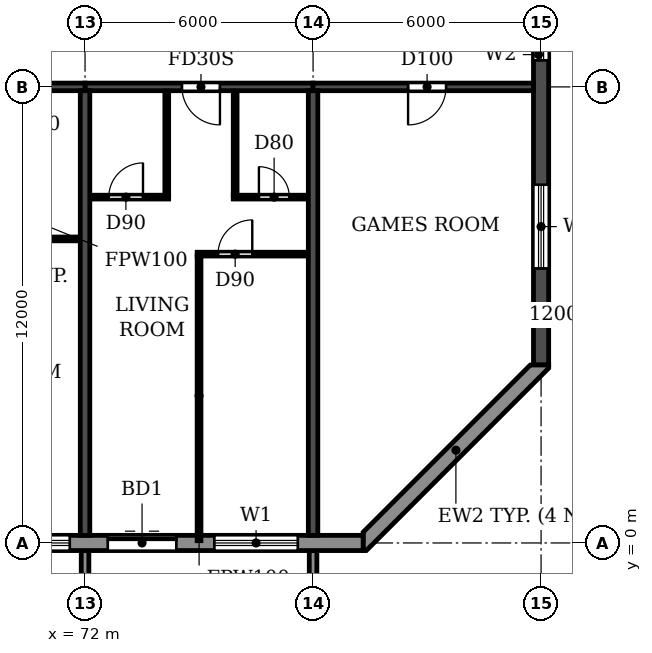
"""IFC4 building model, lengths in metres.
Left out: names, types, materials, properties, quantities, classifications, styles, units other than length and angle.
Written with IfcOpenShell. Run it as: python <this file> out.ifc"""

import sys

from ifc_helpers import new_model, si_unit, direction, frame, frame_2d, origin, place, context, subcontext, project, spatial, polyline, rectangle, outline, extrude, source, transform, mapped, element, fill, save


model = new_model("IFC4")
c1 = context("Model", 3, precision=1e-05, world=origin(), true_north=direction((0.0, 1.0)))
c2 = subcontext(c1, "Body", "Model", "MODEL_VIEW")
j1 = project(units=[si_unit("LENGTHUNIT", "METRE"), si_unit("PLANEANGLEUNIT", "RADIAN")], contexts=[c1])
p1 = place(None, origin())
s1 = spatial("IfcSite", under=j1, at=p1, CompositionType="ELEMENT")
p2 = place(p1, origin())
s2 = spatial("IfcBuilding", under=s1, at=p2, CompositionType="ELEMENT")
p3 = place(p2, frame((0.0, 0.0, 221.4)))
s3 = spatial("IfcBuildingStorey", under=s2, at=p3, CompositionType="ELEMENT", Elevation=221.4)
for number, where, z_axis, x_axis in (
    (1, (72.0, 0.2, 0.0), (0.0, 0.0, 1.0), (0.0, 1.0, 0.0)),
    (2, (78.0, 0.2, 0.0), (0.0, 0.0, 1.0), (0.0, 1.0, 0.0)),
):
    element("IfcWall", number, at=place(p3, frame(where, z_axis=z_axis, x_axis=x_axis)), inside=s3, PredefinedType="SHEAR", context=c2, shape_type="SweptSolid", body=[
        extrude(rectangle(XDim=11.7, YDim=0.25, at=frame_2d((5.85, 0.0))), origin(), (0.0, 0.0, 1.0), 3.08),
    ])
p4 = place(p3, frame((84.0, 4.683, 0.0), z_axis=(0.0, 0.0, 1.0), x_axis=(0.0, 1.0, 0.0)))
e3 = element("IfcWall", 3, at=p4, inside=s3, PredefinedType="SHEAR", context=c2, shape_type="SweptSolid", body=[
    extrude(rectangle(XDim=31.834, YDim=0.4, at=frame_2d((15.917, 0.0))), origin(), (0.0, 0.0, 1.0), 3.08),
])
p5 = place(p4, frame((23.817, 0.0, 0.9)))
e4 = element("IfcOpeningElement", 4, at=p5, cuts=e3, PredefinedType="OPENING", context=c2, shape_type="SweptSolid", body=[
    extrude(rectangle(XDim=1.2, YDim=1.5, at=frame_2d((0.6, 0.75))), frame((0.0, 0.21, 0.0), z_axis=(0.0, -1.0, 0.0), x_axis=(1.0, 0.0, 0.0)), (0.0, 0.0, 1.0), 0.42),
])
p6 = place(p4, frame((8.017, 0.0, 0.9)))
e5 = element("IfcOpeningElement", 5, at=p6, cuts=e3, PredefinedType="OPENING", context=c2, shape_type="SweptSolid", body=[
    extrude(rectangle(XDim=1.2, YDim=1.5, at=frame_2d((0.6, 0.75))), frame((0.0, 0.21, 0.0), z_axis=(0.0, -1.0, 0.0), x_axis=(1.0, 0.0, 0.0)), (0.0, 0.0, 1.0), 0.42),
])
p7 = place(p4, frame((27.694, 0.0, 0.6)))
e6 = element("IfcOpeningElement", 6, at=p7, cuts=e3, PredefinedType="OPENING", context=c2, shape_type="SweptSolid", body=[
    extrude(rectangle(XDim=2.2, YDim=1.8, at=frame_2d((1.1, 0.9))), frame((0.0, 0.21, 0.0), z_axis=(0.0, -1.0, 0.0), x_axis=(1.0, 0.0, 0.0)), (0.0, 0.0, 1.0), 0.42),
])
p8 = place(p4, frame((2.541, 0.0, 0.6)))
e7 = element("IfcOpeningElement", 7, at=p8, cuts=e3, PredefinedType="OPENING", context=c2, shape_type="SweptSolid", body=[
    extrude(rectangle(XDim=2.2, YDim=1.8, at=frame_2d((1.1, 0.9))), frame((0.0, 0.21, 0.0), z_axis=(0.0, -1.0, 0.0), x_axis=(1.0, 0.0, 0.0)), (0.0, 0.0, 1.0), 0.42),
])
p9 = place(p4, frame((15.917, 0.0, 0.9)))
e8 = element("IfcOpeningElement", 8, at=p9, cuts=e3, PredefinedType="OPENING", context=c2, shape_type="SweptSolid", body=[
    extrude(rectangle(XDim=1.2, YDim=1.5, at=frame_2d((0.6, 0.75))), frame((0.0, 0.21, 0.0), z_axis=(0.0, -1.0, 0.0), x_axis=(1.0, 0.0, 0.0)), (0.0, 0.0, 1.0), 0.42),
])
p10 = place(p3, frame((66.0, 12.0, 0.0), z_axis=(0.0, 0.0, 1.0), x_axis=(1.0, 0.0, 0.0)))
e9 = element("IfcWall", 9, at=p10, inside=s3, PredefinedType="SHEAR", context=c2, shape_type="SweptSolid", body=[
    extrude(rectangle(XDim=6.0, YDim=0.2, at=frame_2d((3.0, 0.0))), origin(), (0.0, 0.0, 1.0), 2.48),
])
p11 = place(p10, frame((2.45, 0.0, 0.0)))
e10 = element("IfcOpeningElement", 10, at=p11, cuts=e9, PredefinedType="OPENING", context=c2, shape_type="SweptSolid", body=[
    extrude(rectangle(XDim=1.0, YDim=2.1, at=frame_2d((0.5, 1.05))), frame((0.0, 0.11, 0.0), z_axis=(0.0, -1.0, 0.0), x_axis=(1.0, 0.0, 0.0)), (0.0, 0.0, 1.0), 0.22),
])
p12 = place(p3, frame((72.0, 12.0, 0.0), z_axis=(0.0, 0.0, 1.0), x_axis=(1.0, 0.0, 0.0)))
e11 = element("IfcWall", 11, at=p12, inside=s3, PredefinedType="SHEAR", context=c2, shape_type="SweptSolid", body=[
    extrude(rectangle(XDim=6.0, YDim=0.2, at=frame_2d((3.0, 0.0))), origin(), (0.0, 0.0, 1.0), 2.48),
])
p13 = place(p12, frame((2.55, 0.0, 0.0)))
e12 = element("IfcOpeningElement", 12, at=p13, cuts=e11, PredefinedType="OPENING", context=c2, shape_type="SweptSolid", body=[
    extrude(rectangle(XDim=1.0, YDim=2.1, at=frame_2d((0.5, 1.05))), frame((0.0, 0.11, 0.0), z_axis=(0.0, -1.0, 0.0), x_axis=(1.0, 0.0, 0.0)), (0.0, 0.0, 1.0), 0.22),
])
p14 = place(p3, frame((78.0, 12.0, 0.0), z_axis=(0.0, 0.0, 1.0), x_axis=(1.0, 0.0, 0.0)))
e13 = element("IfcWall", 13, at=p14, inside=s3, PredefinedType="SHEAR", context=c2, shape_type="SweptSolid", body=[
    extrude(rectangle(XDim=5.8, YDim=0.2, at=frame_2d((2.9, 0.0))), origin(), (0.0, 0.0, 1.0), 2.48),
])
p15 = place(p14, frame((2.5, 0.0, 0.0)))
e14 = element("IfcOpeningElement", 14, at=p15, cuts=e13, PredefinedType="OPENING", context=c2, shape_type="SweptSolid", body=[
    extrude(rectangle(XDim=1.0, YDim=2.1, at=frame_2d((0.5, 1.05))), frame((0.0, 0.11, 0.0), z_axis=(0.0, -1.0, 0.0), x_axis=(1.0, 0.0, 0.0)), (0.0, 0.0, 1.0), 0.22),
])
p16 = place(p3, frame((22.683, 0.0, 0.0), z_axis=(0.0, 0.0, 1.0), x_axis=(1.0, 0.0, 0.0)))
e15 = element("IfcWall", 15, at=p16, inside=s3, PredefinedType="STANDARD", context=c2, shape_type="SweptSolid", body=[
    extrude(rectangle(XDim=56.634, YDim=0.4, at=frame_2d((28.317, 0.0))), origin(), (0.0, 0.0, 1.0), 3.08),
])
p17 = place(p16, frame((1.717, 0.0, 0.9)))
e16 = element("IfcOpeningElement", 16, at=p17, cuts=e15, PredefinedType="OPENING", context=c2, shape_type="SweptSolid", body=[
    extrude(rectangle(XDim=2.2, YDim=1.5, at=frame_2d((1.1, 0.75))), frame((0.0, 0.21, 0.0), z_axis=(0.0, -1.0, 0.0), x_axis=(1.0, 0.0, 0.0)), (0.0, 0.0, 1.0), 0.42),
])
p18 = place(p16, frame((4.917, 0.0, 0.0)))
e17 = element("IfcOpeningElement", 17, at=p18, cuts=e15, PredefinedType="OPENING", context=c2, shape_type="SweptSolid", body=[
    extrude(rectangle(XDim=1.8, YDim=2.4, at=frame_2d((0.9, 1.2))), frame((0.0, 0.21, 0.0), z_axis=(0.0, -1.0, 0.0), x_axis=(1.0, 0.0, 0.0)), (0.0, 0.0, 1.0), 0.42),
])
p19 = place(p16, frame((7.717, 0.0, 0.9)))
e18 = element("IfcOpeningElement", 18, at=p19, cuts=e15, PredefinedType="OPENING", context=c2, shape_type="SweptSolid", body=[
    extrude(rectangle(XDim=2.2, YDim=1.5, at=frame_2d((1.1, 0.75))), frame((0.0, 0.21, 0.0), z_axis=(0.0, -1.0, 0.0), x_axis=(1.0, 0.0, 0.0)), (0.0, 0.0, 1.0), 0.42),
])
p20 = place(p16, frame((10.717, 0.0, 0.9)))
e19 = element("IfcOpeningElement", 19, at=p20, cuts=e15, PredefinedType="OPENING", context=c2, shape_type="SweptSolid", body=[
    extrude(rectangle(XDim=2.2, YDim=1.5, at=frame_2d((1.1, 0.75))), frame((0.0, 0.21, 0.0), z_axis=(0.0, -1.0, 0.0), x_axis=(1.0, 0.0, 0.0)), (0.0, 0.0, 1.0), 0.42),
])
p21 = place(p16, frame((13.717, 0.0, 0.9)))
e20 = element("IfcOpeningElement", 20, at=p21, cuts=e15, PredefinedType="OPENING", context=c2, shape_type="SweptSolid", body=[
    extrude(rectangle(XDim=2.2, YDim=1.5, at=frame_2d((1.1, 0.75))), frame((0.0, 0.21, 0.0), z_axis=(0.0, -1.0, 0.0), x_axis=(1.0, 0.0, 0.0)), (0.0, 0.0, 1.0), 0.42),
])
p22 = place(p16, frame((16.917, 0.0, 0.0)))
e21 = element("IfcOpeningElement", 21, at=p22, cuts=e15, PredefinedType="OPENING", context=c2, shape_type="SweptSolid", body=[
    extrude(rectangle(XDim=1.8, YDim=2.4, at=frame_2d((0.9, 1.2))), frame((0.0, 0.21, 0.0), z_axis=(0.0, -1.0, 0.0), x_axis=(1.0, 0.0, 0.0)), (0.0, 0.0, 1.0), 0.42),
])
p23 = place(p16, frame((19.717, 0.0, 0.9)))
e22 = element("IfcOpeningElement", 22, at=p23, cuts=e15, PredefinedType="OPENING", context=c2, shape_type="SweptSolid", body=[
    extrude(rectangle(XDim=2.2, YDim=1.5, at=frame_2d((1.1, 0.75))), frame((0.0, 0.21, 0.0), z_axis=(0.0, -1.0, 0.0), x_axis=(1.0, 0.0, 0.0)), (0.0, 0.0, 1.0), 0.42),
])
p24 = place(p16, frame((22.717, 0.0, 0.9)))
e23 = element("IfcOpeningElement", 23, at=p24, cuts=e15, PredefinedType="OPENING", context=c2, shape_type="SweptSolid", body=[
    extrude(rectangle(XDim=2.2, YDim=1.5, at=frame_2d((1.1, 0.75))), frame((0.0, 0.21, 0.0), z_axis=(0.0, -1.0, 0.0), x_axis=(1.0, 0.0, 0.0)), (0.0, 0.0, 1.0), 0.42),
])
p25 = place(p16, frame((25.917, 0.0, 0.0)))
e24 = element("IfcOpeningElement", 24, at=p25, cuts=e15, PredefinedType="OPENING", context=c2, shape_type="SweptSolid", body=[
    extrude(rectangle(XDim=1.8, YDim=2.4, at=frame_2d((0.9, 1.2))), frame((0.0, 0.21, 0.0), z_axis=(0.0, -1.0, 0.0), x_axis=(1.0, 0.0, 0.0)), (0.0, 0.0, 1.0), 0.42),
])
p26 = place(p16, frame((28.717, 0.0, 0.9)))
e25 = element("IfcOpeningElement", 25, at=p26, cuts=e15, PredefinedType="OPENING", context=c2, shape_type="SweptSolid", body=[
    extrude(rectangle(XDim=2.2, YDim=1.5, at=frame_2d((1.1, 0.75))), frame((0.0, 0.21, 0.0), z_axis=(0.0, -1.0, 0.0), x_axis=(1.0, 0.0, 0.0)), (0.0, 0.0, 1.0), 0.42),
])
p27 = place(p16, frame((31.717, 0.0, 0.9)))
e26 = element("IfcOpeningElement", 26, at=p27, cuts=e15, PredefinedType="OPENING", context=c2, shape_type="SweptSolid", body=[
    extrude(rectangle(XDim=2.2, YDim=1.5, at=frame_2d((1.1, 0.75))), frame((0.0, 0.21, 0.0), z_axis=(0.0, -1.0, 0.0), x_axis=(1.0, 0.0, 0.0)), (0.0, 0.0, 1.0), 0.42),
])
p28 = place(p16, frame((34.717, 0.0, 0.9)))
e27 = element("IfcOpeningElement", 27, at=p28, cuts=e15, PredefinedType="OPENING", context=c2, shape_type="SweptSolid", body=[
    extrude(rectangle(XDim=2.2, YDim=1.5, at=frame_2d((1.1, 0.75))), frame((0.0, 0.21, 0.0), z_axis=(0.0, -1.0, 0.0), x_axis=(1.0, 0.0, 0.0)), (0.0, 0.0, 1.0), 0.42),
])
p29 = place(p16, frame((37.917, 0.0, 0.0)))
e28 = element("IfcOpeningElement", 28, at=p29, cuts=e15, PredefinedType="OPENING", context=c2, shape_type="SweptSolid", body=[
    extrude(rectangle(XDim=1.8, YDim=2.4, at=frame_2d((0.9, 1.2))), frame((0.0, 0.21, 0.0), z_axis=(0.0, -1.0, 0.0), x_axis=(1.0, 0.0, 0.0)), (0.0, 0.0, 1.0), 0.42),
])
p30 = place(p16, frame((40.717, 0.0, 0.9)))
e29 = element("IfcOpeningElement", 29, at=p30, cuts=e15, PredefinedType="OPENING", context=c2, shape_type="SweptSolid", body=[
    extrude(rectangle(XDim=2.2, YDim=1.5, at=frame_2d((1.1, 0.75))), frame((0.0, 0.21, 0.0), z_axis=(0.0, -1.0, 0.0), x_axis=(1.0, 0.0, 0.0)), (0.0, 0.0, 1.0), 0.42),
])
p31 = place(p16, frame((43.717, 0.0, 0.9)))
e30 = element("IfcOpeningElement", 30, at=p31, cuts=e15, PredefinedType="OPENING", context=c2, shape_type="SweptSolid", body=[
    extrude(rectangle(XDim=2.2, YDim=1.5, at=frame_2d((1.1, 0.75))), frame((0.0, 0.21, 0.0), z_axis=(0.0, -1.0, 0.0), x_axis=(1.0, 0.0, 0.0)), (0.0, 0.0, 1.0), 0.42),
])
p32 = place(p16, frame((46.717, 0.0, 0.9)))
e31 = element("IfcOpeningElement", 31, at=p32, cuts=e15, PredefinedType="OPENING", context=c2, shape_type="SweptSolid", body=[
    extrude(rectangle(XDim=2.2, YDim=1.5, at=frame_2d((1.1, 0.75))), frame((0.0, 0.21, 0.0), z_axis=(0.0, -1.0, 0.0), x_axis=(1.0, 0.0, 0.0)), (0.0, 0.0, 1.0), 0.42),
])
p33 = place(p16, frame((49.917, 0.0, 0.0)))
e32 = element("IfcOpeningElement", 32, at=p33, cuts=e15, PredefinedType="OPENING", context=c2, shape_type="SweptSolid", body=[
    extrude(rectangle(XDim=1.8, YDim=2.4, at=frame_2d((0.9, 1.2))), frame((0.0, 0.21, 0.0), z_axis=(0.0, -1.0, 0.0), x_axis=(1.0, 0.0, 0.0)), (0.0, 0.0, 1.0), 0.42),
])
p34 = place(p16, frame((52.717, 0.0, 0.9)))
e33 = element("IfcOpeningElement", 33, at=p34, cuts=e15, PredefinedType="OPENING", context=c2, shape_type="SweptSolid", body=[
    extrude(rectangle(XDim=2.2, YDim=1.5, at=frame_2d((1.1, 0.75))), frame((0.0, 0.21, 0.0), z_axis=(0.0, -1.0, 0.0), x_axis=(1.0, 0.0, 0.0)), (0.0, 0.0, 1.0), 0.42),
])
p35 = place(p3, origin())
e34 = element("IfcWall", 34, at=p35, inside=s3, PredefinedType="STANDARD", context=c2, shape_type="SweptSolid", body=[
    extrude(outline(polyline([(79.317, -0.2), (79.4, -0.2), (84.2, 4.6), (84.2, 4.683), (83.717, 4.683), (79.317, 0.283), (79.317, -0.2)])), origin(), (0.0, 0.0, 1.0), 3.08),
])
m1 = source(origin(), c2, "Body", "SweptSolid", [
    extrude(outline(polyline([(0.0, 0.0), (0.2, 0.0), (0.2, 1.65), (0.0, 1.65), (0.0, 0.0)])), origin(), (0.0, 0.0, 1.0), 3.1),
])
for number, where in (
    (35, (71.9, -1.85, 0.0)),
    (36, (77.9, -1.85, 0.0)),
):
    element("IfcWall", number, at=place(p3, frame(where)), inside=s3, PredefinedType="STANDARD", context=c2, shape_type="MappedRepresentation", body=[
        mapped(m1, transform((0.0, 0.0, 0.0))),
    ])
p36 = place(p3, frame((74.95, 7.6, 0.0), z_axis=(0.0, 0.0, 1.0), x_axis=(1.0, 0.0, 0.0)))
e37 = element("IfcWall", 37, at=p36, inside=s3, PredefinedType="PARTITIONING", context=c2, shape_type="SweptSolid", body=[
    extrude(rectangle(XDim=2.915, YDim=0.1, at=frame_2d((1.458, 0.0))), origin(), (0.0, 0.0, 1.0), 3.08),
])
p37 = place(p36, frame((0.55, 0.0, 0.0)))
e38 = element("IfcOpeningElement", 38, at=p37, cuts=e37, PredefinedType="OPENING", context=c2, shape_type="SweptSolid", body=[
    extrude(rectangle(XDim=0.9, YDim=2.1, at=frame_2d((0.45, 1.05))), frame((0.0, 0.06, 0.0), z_axis=(0.0, -1.0, 0.0), x_axis=(1.0, 0.0, 0.0)), (0.0, 0.0, 1.0), 0.12),
])
p38 = place(p3, frame((69.8, 8.0, 0.0), z_axis=(0.0, 0.0, 1.0), x_axis=(1.0, 0.0, 0.0)))
e39 = element("IfcWall", 39, at=p38, inside=s3, PredefinedType="PARTITIONING", context=c2, shape_type="SweptSolid", body=[
    extrude(rectangle(XDim=2.065, YDim=0.1, at=frame_2d((1.032, 0.0))), origin(), (0.0, 0.0, 1.0), 3.08),
])
p39 = place(p3, frame((72.135, 9.1, 0.0), z_axis=(0.0, 0.0, 1.0), x_axis=(1.0, 0.0, 0.0)))
e40 = element("IfcWall", 40, at=p39, inside=s3, PredefinedType="PARTITIONING", context=c2, shape_type="SweptSolid", body=[
    extrude(rectangle(XDim=2.065, YDim=0.1, at=frame_2d((1.032, 0.0))), origin(), (0.0, 0.0, 1.0), 3.08),
])
p40 = place(p39, frame((0.49, 0.0, 0.0)))
e41 = element("IfcOpeningElement", 41, at=p40, cuts=e40, PredefinedType="OPENING", context=c2, shape_type="SweptSolid", body=[
    extrude(rectangle(XDim=0.9, YDim=2.1, at=frame_2d((0.45, 1.05))), frame((0.0, 0.06, 0.0), z_axis=(0.0, -1.0, 0.0), x_axis=(1.0, 0.0, 0.0)), (0.0, 0.0, 1.0), 0.12),
])
p41 = place(p3, frame((75.9, 9.1, 0.0), z_axis=(0.0, 0.0, 1.0), x_axis=(1.0, 0.0, 0.0)))
e42 = element("IfcWall", 42, at=p41, inside=s3, PredefinedType="PARTITIONING", context=c2, shape_type="SweptSolid", body=[
    extrude(rectangle(XDim=1.965, YDim=0.1, at=frame_2d((0.982, 0.0))), origin(), (0.0, 0.0, 1.0), 3.08),
])
p42 = place(p41, frame((0.675, 0.0, 0.0)))
e43 = element("IfcOpeningElement", 43, at=p42, cuts=e42, PredefinedType="OPENING", context=c2, shape_type="SweptSolid", body=[
    extrude(rectangle(XDim=0.8, YDim=2.1, at=frame_2d((0.4, 1.05))), frame((0.0, 0.06, 0.0), z_axis=(0.0, -1.0, 0.0), x_axis=(1.0, 0.0, 0.0)), (0.0, 0.0, 1.0), 0.12),
])
p43 = place(p3, frame((74.15, 9.15, 0.0), z_axis=(0.0, 0.0, 1.0), x_axis=(0.0, 1.0, 0.0)))
e44 = element("IfcWall", 44, at=p43, inside=s3, PredefinedType="PARTITIONING", context=c2, shape_type="SweptSolid", body=[
    extrude(rectangle(XDim=2.74, YDim=0.1, at=frame_2d((1.37, 0.0))), origin(), (0.0, 0.0, 1.0), 3.08),
])
p44 = place(p3, frame((75.0, 0.06, 0.0), z_axis=(0.0, 0.0, 1.0), x_axis=(0.0, 1.0, 0.0)))
e45 = element("IfcWall", 45, at=p44, inside=s3, PredefinedType="PARTITIONING", context=c2, shape_type="SweptSolid", body=[
    extrude(rectangle(XDim=7.49, YDim=0.1, at=frame_2d((3.745, 0.0))), origin(), (0.0, 0.0, 1.0), 3.08),
])
p45 = place(p3, frame((75.95, 9.15, 0.0), z_axis=(0.0, 0.0, 1.0), x_axis=(0.0, 1.0, 0.0)))
e46 = element("IfcWall", 46, at=p45, inside=s3, PredefinedType="PARTITIONING", context=c2, shape_type="SweptSolid", body=[
    extrude(rectangle(XDim=2.74, YDim=0.1, at=frame_2d((1.37, 0.0))), origin(), (0.0, 0.0, 1.0), 3.08),
])
p46 = place(p32, origin())
e47 = element("IfcWindow", 47, at=p46, inside=s3, PartitioningType="DOUBLE_PANEL_HORIZONTAL", PredefinedType="WINDOW", context=c2, shape_type="SweptSolid", body=[
    extrude(rectangle(XDim=2.2, YDim=1.5, at=frame_2d((1.1, 0.75))), frame((0.0, 0.03, 0.0), z_axis=(0.0, -1.0, 0.0), x_axis=(1.0, 0.0, 0.0)), (0.0, 0.0, 1.0), 0.06),
])
fill(e31, e47)
p47 = place(p33, origin())
e48 = element("IfcDoor", 48, at=p47, inside=s3, OperationType="DOUBLE_DOOR_SLIDING", PredefinedType="DOOR", context=c2, shape_type="SweptSolid", body=[
    extrude(rectangle(XDim=1.8, YDim=2.4, at=frame_2d((0.9, 1.2))), frame((0.0, 0.025, 0.0), z_axis=(0.0, -1.0, 0.0), x_axis=(1.0, 0.0, 0.0)), (0.0, 0.0, 1.0), 0.05),
])
fill(e32, e48)
p48 = place(p34, origin())
e49 = element("IfcWindow", 49, at=p48, inside=s3, PartitioningType="DOUBLE_PANEL_HORIZONTAL", PredefinedType="WINDOW", context=c2, shape_type="SweptSolid", body=[
    extrude(rectangle(XDim=2.2, YDim=1.5, at=frame_2d((1.1, 0.75))), frame((0.0, 0.03, 0.0), z_axis=(0.0, -1.0, 0.0), x_axis=(1.0, 0.0, 0.0)), (0.0, 0.0, 1.0), 0.06),
])
fill(e33, e49)
p49 = place(p6, origin())
e50 = element("IfcWindow", 50, at=p49, inside=s3, PartitioningType="SINGLE_PANEL", PredefinedType="WINDOW", context=c2, shape_type="SweptSolid", body=[
    extrude(rectangle(XDim=1.2, YDim=1.5, at=frame_2d((0.6, 0.75))), frame((0.0, 0.03, 0.0), z_axis=(0.0, -1.0, 0.0), x_axis=(1.0, 0.0, 0.0)), (0.0, 0.0, 1.0), 0.06),
])
fill(e5, e50)
p50 = place(p8, origin())
e51 = element("IfcWindow", 51, at=p50, inside=s3, PartitioningType="DOUBLE_PANEL_HORIZONTAL", PredefinedType="WINDOW", context=c2, shape_type="SweptSolid", body=[
    extrude(rectangle(XDim=2.2, YDim=1.8, at=frame_2d((1.1, 0.9))), frame((0.0, 0.03, 0.0), z_axis=(0.0, -1.0, 0.0), x_axis=(1.0, 0.0, 0.0)), (0.0, 0.0, 1.0), 0.06),
])
fill(e7, e51)
p51 = place(p40, origin())
e52 = element("IfcDoor", 52, at=p51, inside=s3, OperationType="SINGLE_SWING_RIGHT", PredefinedType="DOOR", context=c2, shape_type="SweptSolid", body=[
    extrude(rectangle(XDim=0.9, YDim=2.1, at=frame_2d((0.45, 1.05))), frame((0.0, 0.025, 0.0), z_axis=(0.0, -1.0, 0.0), x_axis=(1.0, 0.0, 0.0)), (0.0, 0.0, 1.0), 0.05),
])
fill(e41, e52)
p52 = place(p13, frame((1.0, 0.0, 0.0), z_axis=(0.0, 0.0, 1.0), x_axis=(-1.0, 0.0, 0.0)))
e53 = element("IfcDoor", 53, at=p52, inside=s3, OperationType="SINGLE_SWING_LEFT", PredefinedType="DOOR", context=c2, shape_type="SweptSolid", body=[
    extrude(rectangle(XDim=1.0, YDim=2.1, at=frame_2d((0.5, 1.05))), frame((0.0, 0.025, 0.0), z_axis=(0.0, -1.0, 0.0), x_axis=(1.0, 0.0, 0.0)), (0.0, 0.0, 1.0), 0.05),
])
fill(e12, e53)
p53 = place(p37, origin())
e54 = element("IfcDoor", 54, at=p53, inside=s3, OperationType="SINGLE_SWING_RIGHT", PredefinedType="DOOR", context=c2, shape_type="SweptSolid", body=[
    extrude(rectangle(XDim=0.9, YDim=2.1, at=frame_2d((0.45, 1.05))), frame((0.0, 0.025, 0.0), z_axis=(0.0, -1.0, 0.0), x_axis=(1.0, 0.0, 0.0)), (0.0, 0.0, 1.0), 0.05),
])
fill(e38, e54)
p54 = place(p42, origin())
e55 = element("IfcDoor", 55, at=p54, inside=s3, OperationType="SINGLE_SWING_LEFT", PredefinedType="DOOR", context=c2, shape_type="SweptSolid", body=[
    extrude(rectangle(XDim=0.8, YDim=2.1, at=frame_2d((0.4, 1.05))), frame((0.0, 0.025, 0.0), z_axis=(0.0, -1.0, 0.0), x_axis=(1.0, 0.0, 0.0)), (0.0, 0.0, 1.0), 0.05),
])
fill(e43, e55)
p55 = place(p15, frame((1.0, 0.0, 0.0), z_axis=(0.0, 0.0, 1.0), x_axis=(-1.0, 0.0, 0.0)))
e56 = element("IfcDoor", 56, at=p55, inside=s3, OperationType="SINGLE_SWING_RIGHT", PredefinedType="DOOR", context=c2, shape_type="SweptSolid", body=[
    extrude(rectangle(XDim=1.0, YDim=2.1, at=frame_2d((0.5, 1.05))), frame((0.0, 0.025, 0.0), z_axis=(0.0, -1.0, 0.0), x_axis=(1.0, 0.0, 0.0)), (0.0, 0.0, 1.0), 0.05),
])
fill(e14, e56)
save(model, sys.argv[1])
